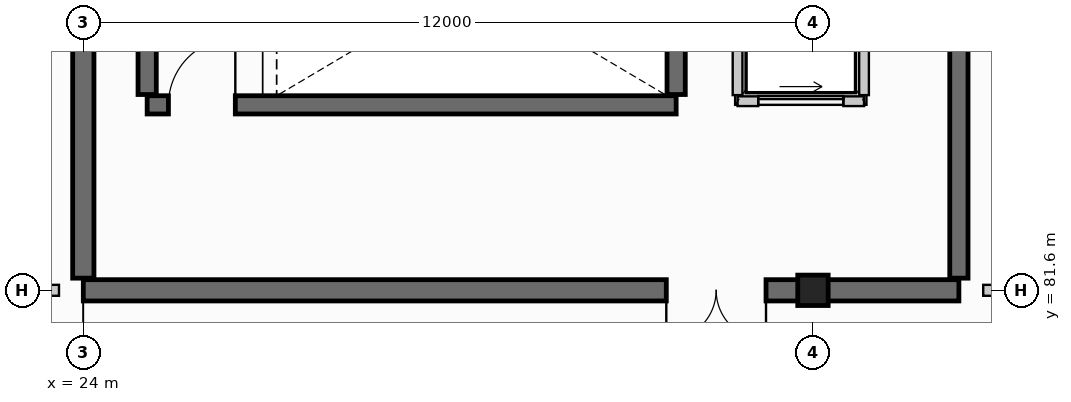
"""IFC4 building model, lengths in metres.
Left out: names, types, materials, properties, quantities, classifications, styles, units other than length and angle.
Written with IfcOpenShell. Run it as: python <this file> out.ifc"""

import sys

from ifc_helpers import new_model, si_unit, direction, frame, frame_2d, origin, origin_2d, place, context, subcontext, project, spatial, rectangle, i_section, extrude, element, fill, save


model = new_model("IFC4")
c1 = context("Model", 3, precision=1e-05, world=origin(), true_north=direction((0.0, 1.0)))
c2 = subcontext(c1, "Body", "Model", "MODEL_VIEW")
j1 = project(units=[si_unit("LENGTHUNIT", "METRE"), si_unit("PLANEANGLEUNIT", "RADIAN")], contexts=[c1])
p1 = place(None, origin())
s1 = spatial("IfcSite", under=j1, at=p1, CompositionType="ELEMENT")
p2 = place(p1, origin())
s2 = spatial("IfcBuilding", under=s1, at=p2, CompositionType="ELEMENT")
p3 = place(p2, frame((0.0, 0.0, 9.6)))
s3 = spatial("IfcBuildingStorey", under=s2, at=p3, CompositionType="ELEMENT", Elevation=9.6)
p4 = place(p3, frame((36.0, 81.6, 0.0), z_axis=(0.0, 0.0, 1.0), x_axis=(0.0, 1.0, 0.0)))
e1 = element("IfcColumn", 1, at=p4, inside=s3, PredefinedType="COLUMN", context=c2, shape_type="SweptSolid", body=[
    extrude(i_section(OverallWidth=0.5, OverallDepth=0.5, WebThickness=0.022, FlangeThickness=0.036, at=origin_2d()), origin(), (0.0, 0.0, 1.0), 4.8),
])
p5 = place(p3, frame((38.4, 81.6, 0.0), z_axis=(0.0, 0.0, 1.0), x_axis=(-1.0, 0.0, 0.0)))
e2 = element("IfcWall", 2, at=p5, inside=s3, PredefinedType="SHEAR", context=c2, shape_type="SweptSolid", body=[
    extrude(rectangle(XDim=14.4, YDim=0.35, at=frame_2d((7.2, 0.0))), origin(), (0.0, 0.0, 1.0), 4.8),
])
p6 = place(p5, frame((3.172, 0.0, 0.0)))
e3 = element("IfcOpeningElement", 3, at=p6, cuts=e2, PredefinedType="OPENING", context=c2, shape_type="SweptSolid", body=[
    extrude(rectangle(XDim=1.64, YDim=2.2, at=frame_2d((0.82, 1.1))), frame((0.0, 0.185, 0.0), z_axis=(0.0, -1.0, 0.0), x_axis=(1.0, 0.0, 0.0)), (0.0, 0.0, 1.0), 0.37),
])
p7 = place(p3, frame((24.0, 81.8, 0.0), z_axis=(0.0, 0.0, 1.0), x_axis=(0.0, 1.0, 0.0)))
e4 = element("IfcWall", 4, at=p7, inside=s3, PredefinedType="SHEAR", context=c2, shape_type="SweptSolid", body=[
    extrude(rectangle(XDim=8.0, YDim=0.35, at=frame_2d((4.0, 0.0))), origin(), (0.0, 0.0, 1.0), 4.8),
])
p8 = place(p3, frame((38.4, 89.8, 0.0), z_axis=(0.0, 0.0, 1.0), x_axis=(0.0, -1.0, 0.0)))
e5 = element("IfcWall", 5, at=p8, inside=s3, PredefinedType="SHEAR", context=c2, shape_type="SweptSolid", body=[
    extrude(rectangle(XDim=8.0, YDim=0.3, at=frame_2d((4.0, 0.0))), origin(), (0.0, 0.0, 1.0), 4.8),
])
p9 = place(p3, frame((25.05, 84.65, 0.0), z_axis=(0.0, 0.0, 1.0), x_axis=(1.0, 0.0, 0.0)))
e6 = element("IfcWall", 6, at=p9, inside=s3, PredefinedType="SHEAR", context=c2, shape_type="SweptSolid", body=[
    extrude(rectangle(XDim=8.7, YDim=0.3, at=frame_2d((4.35, 0.0))), origin(), (0.0, 0.0, 1.0), 4.8),
])
p10 = place(p9, frame((0.35, 0.0, 0.0)))
e7 = element("IfcOpeningElement", 7, at=p10, cuts=e6, PredefinedType="OPENING", context=c2, shape_type="SweptSolid", body=[
    extrude(rectangle(XDim=1.1, YDim=2.15, at=frame_2d((0.55, 1.075))), frame((0.0, 0.16, 0.0), z_axis=(0.0, -1.0, 0.0), x_axis=(1.0, 0.0, 0.0)), (0.0, 0.0, 1.0), 0.32),
])
for number, where, z_axis, x_axis in (
    (8, (25.05, 84.82, 0.0), (0.0, 0.0, 1.0), (0.0, 1.0, 0.0)),
    (9, (33.75, 84.82, 0.0), (0.0, 0.0, 1.0), (0.0, 1.0, 0.0)),
):
    element("IfcWall", number, at=place(p3, frame(where, z_axis=z_axis, x_axis=x_axis)), inside=s3, PredefinedType="SHEAR", context=c2, shape_type="SweptSolid", body=[
        extrude(rectangle(XDim=3.76, YDim=0.3, at=frame_2d((1.88, 0.0))), origin(), (0.0, 0.0, 1.0), 4.8),
    ])
p11 = place(p3, frame((34.76, 84.71, 0.0), z_axis=(0.0, 0.0, 1.0), x_axis=(1.0, 0.0, 0.0)))
e10 = element("IfcWall", 10, at=p11, inside=s3, PredefinedType="PARTITIONING", context=c2, shape_type="SweptSolid", body=[
    extrude(rectangle(XDim=2.08, YDim=0.16, at=frame_2d((1.04, 0.0))), origin(), (0.0, 0.0, 1.0), 4.43),
])
p12 = place(p11, frame((0.34, 0.0, 0.0)))
e11 = element("IfcOpeningElement", 11, at=p12, cuts=e10, PredefinedType="OPENING", context=c2, shape_type="SweptSolid", body=[
    extrude(rectangle(XDim=1.4, YDim=2.2, at=frame_2d((0.7, 1.1))), frame((0.0, 0.09, 0.0), z_axis=(0.0, -1.0, 0.0), x_axis=(1.0, 0.0, 0.0)), (0.0, 0.0, 1.0), 0.18),
])
for number, where, z_axis, x_axis in (
    (12, (34.76, 87.59, 0.0), (0.0, 0.0, 1.0), (0.0, -1.0, 0.0)),
    (13, (36.84, 84.81, 0.0), (0.0, 0.0, 1.0), (0.0, 1.0, 0.0)),
):
    element("IfcWall", number, at=place(p3, frame(where, z_axis=z_axis, x_axis=x_axis)), inside=s3, PredefinedType="PARTITIONING", context=c2, shape_type="SweptSolid", body=[
        extrude(rectangle(XDim=2.78, YDim=0.16, at=frame_2d((1.39, 0.0))), origin(), (0.0, 0.0, 1.0), 4.43),
    ])
p13 = place(p3, frame((14.3, 81.6, 0.0), z_axis=(0.0, 0.0, 1.0), x_axis=(1.0, 0.0, 0.0)))
e14 = element("IfcWall", 14, at=p13, inside=s3, PredefinedType="PARTITIONING", context=c2, shape_type="SweptSolid", body=[
    extrude(rectangle(XDim=9.3, YDim=0.18, at=frame_2d((4.65, 0.0))), origin(), (0.0, 0.0, 1.0), 4.43),
])
p14 = place(p13, frame((4.0, 0.0, 0.0)))
e15 = element("IfcOpeningElement", 15, at=p14, cuts=e14, PredefinedType="OPENING", context=c2, shape_type="SweptSolid", body=[
    extrude(rectangle(XDim=1.98, YDim=2.26, at=frame_2d((0.99, 1.13))), frame((0.0, 0.1, 0.0), z_axis=(0.0, -1.0, 0.0), x_axis=(1.0, 0.0, 0.0)), (0.0, 0.0, 1.0), 0.2),
])
p15 = place(p3, frame((38.8, 81.6, 0.0), z_axis=(0.0, 0.0, 1.0), x_axis=(1.0, 0.0, 0.0)))
e16 = element("IfcWall", 16, at=p15, inside=s3, PredefinedType="PARTITIONING", context=c2, shape_type="SweptSolid", body=[
    extrude(rectangle(XDim=2.9, YDim=0.18, at=frame_2d((1.45, 0.0))), origin(), (0.0, 0.0, 1.0), 3.835),
])
p16 = place(p15, frame((0.32, 0.0, 0.0)))
e17 = element("IfcOpeningElement", 17, at=p16, cuts=e16, PredefinedType="OPENING", context=c2, shape_type="SweptSolid", body=[
    extrude(rectangle(XDim=1.8, YDim=2.32, at=frame_2d((0.9, 1.16))), frame((0.0, 0.1, 0.0), z_axis=(0.0, -1.0, 0.0), x_axis=(1.0, 0.0, 0.0)), (0.0, 0.0, 1.0), 0.2),
])
p17 = place(p12, origin())
e18 = element("IfcDoor", 18, at=p17, inside=s3, OperationType="SLIDING_TO_RIGHT", PredefinedType="DOOR", context=c2, shape_type="SweptSolid", body=[
    extrude(rectangle(XDim=1.4, YDim=2.2, at=frame_2d((0.7, 1.1))), frame((0.0, 0.025, 0.0), z_axis=(0.0, -1.0, 0.0), x_axis=(1.0, 0.0, 0.0)), (0.0, 0.0, 1.0), 0.05),
])
fill(e11, e18)
p18 = place(p10, origin())
e19 = element("IfcDoor", 19, at=p18, inside=s3, OperationType="SINGLE_SWING_RIGHT", PredefinedType="DOOR", context=c2, shape_type="SweptSolid", body=[
    extrude(rectangle(XDim=1.1, YDim=2.15, at=frame_2d((0.55, 1.075))), frame((0.0, 0.025, 0.0), z_axis=(0.0, -1.0, 0.0), x_axis=(1.0, 0.0, 0.0)), (0.0, 0.0, 1.0), 0.05),
])
fill(e7, e19)
p19 = place(p6, origin())
e20 = element("IfcDoor", 20, at=p19, inside=s3, OperationType="DOUBLE_DOOR_SINGLE_SWING", PredefinedType="DOOR", context=c2, shape_type="SweptSolid", body=[
    extrude(rectangle(XDim=1.64, YDim=2.2, at=frame_2d((0.82, 1.1))), frame((0.0, 0.025, 0.0), z_axis=(0.0, -1.0, 0.0), x_axis=(1.0, 0.0, 0.0)), (0.0, 0.0, 1.0), 0.05),
])
fill(e3, e20)
save(model, sys.argv[1])
